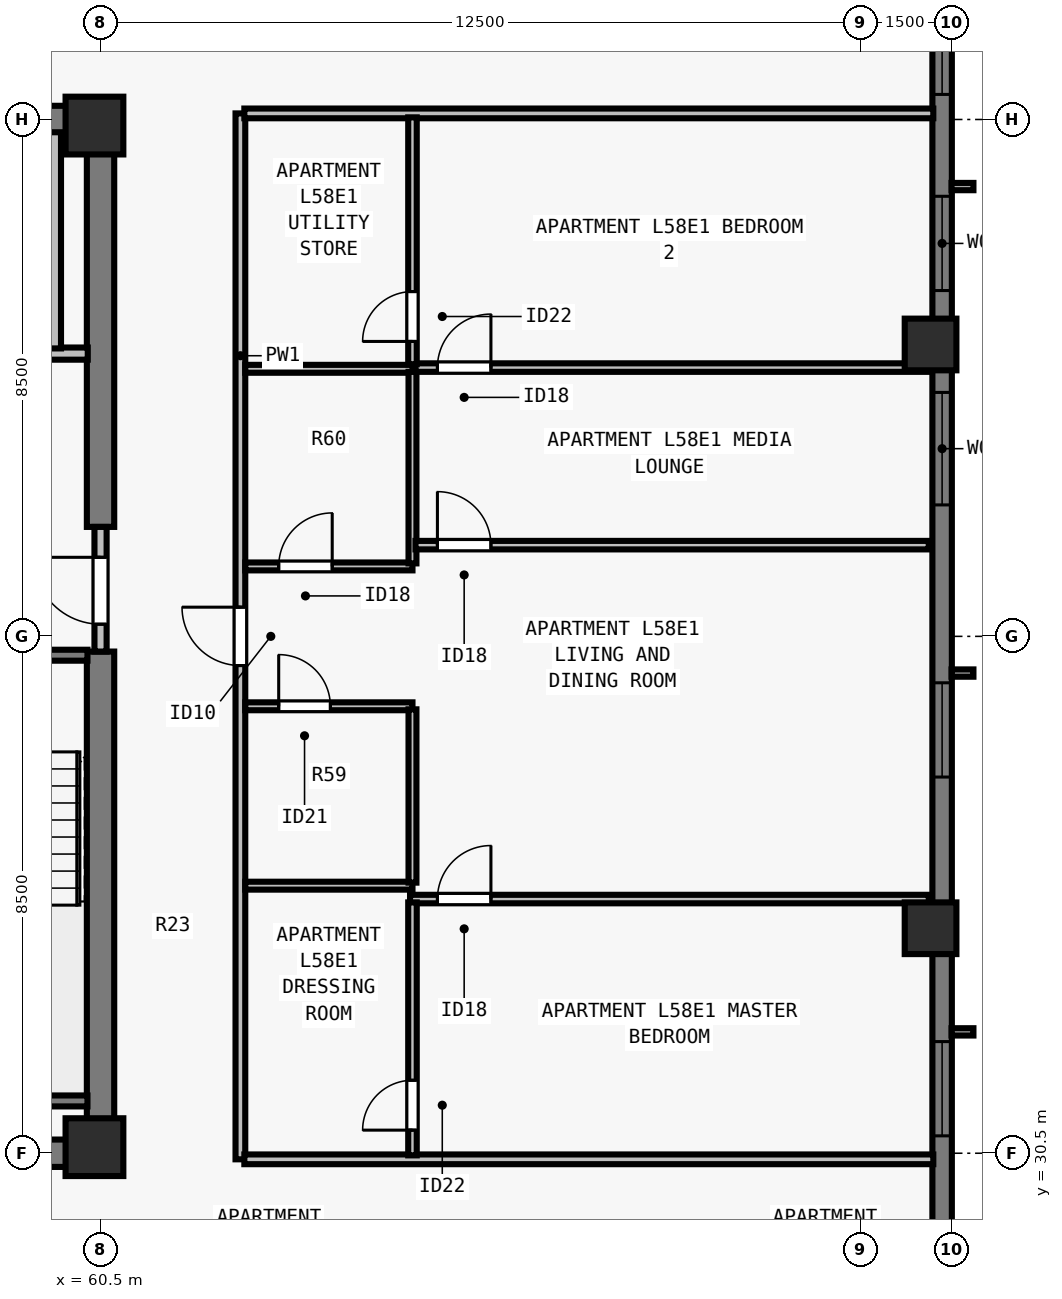
"""IFC4 building model, lengths in metres.
Left out: names, types, materials, properties, quantities, classifications, styles, units other than length and angle.
Written with IfcOpenShell. Run it as: python <this file> out.ifc"""

import sys

from ifc_helpers import new_model, si_unit, direction, frame, frame_2d, origin, origin_2d, place, context, subcontext, project, spatial, rectangle, extrude, element, fill, save


model = new_model("IFC4")
c1 = context("Model", 3, precision=1e-05, world=origin(), true_north=direction((0.0, 1.0)))
c2 = subcontext(c1, "Body", "Model", "MODEL_VIEW")
j1 = project(units=[si_unit("LENGTHUNIT", "METRE"), si_unit("PLANEANGLEUNIT", "RADIAN")], contexts=[c1])
p1 = place(None, origin())
s1 = spatial("IfcSite", under=j1, at=p1, CompositionType="ELEMENT")
p2 = place(p1, origin())
s2 = spatial("IfcBuilding", under=s1, at=p2, CompositionType="ELEMENT")
p3 = place(p2, frame((0.0, 0.0, 213.0)))
s3 = spatial("IfcBuildingStorey", under=s2, at=p3, CompositionType="ELEMENT", Elevation=213.0)
for number, where, z_axis, x_axis in (
    (1, (60.4, 30.6, 0.0), (0.0, 0.0, 1.0), (1.0, 0.0, 0.0)),
    (2, (60.4, 47.4, 0.0), (0.0, 0.0, 1.0), (1.0, 0.0, 0.0)),
):
    element("IfcColumn", number, at=place(p3, frame(where, z_axis=z_axis, x_axis=x_axis)), inside=s3, PredefinedType="COLUMN", context=c2, shape_type="SweptSolid", body=[
        extrude(rectangle(XDim=0.95, YDim=0.95, at=origin_2d()), origin(), (0.0, 0.0, 1.0), 3.5),
    ])
for number, where, z_axis, x_axis in (
    (3, (74.15, 34.2, 0.0), (0.0, 0.0, 1.0), (0.0, 1.0, 0.0)),
    (4, (74.15, 43.8, 0.0), (0.0, 0.0, 1.0), (0.0, 1.0, 0.0)),
):
    element("IfcColumn", number, at=place(p3, frame(where, z_axis=z_axis, x_axis=x_axis)), inside=s3, PredefinedType="COLUMN", context=c2, shape_type="SweptSolid", body=[
        extrude(rectangle(XDim=0.85, YDim=0.85, at=origin_2d()), origin(), (0.0, 0.0, 1.0), 3.5),
    ])
p4 = place(p3, frame((74.34, 56.5, 0.0), z_axis=(0.0, 0.0, 1.0), x_axis=(0.0, -1.0, 0.0)))
e5 = element("IfcWall", 5, at=p4, inside=s3, PredefinedType="SOLIDWALL", context=c2, shape_type="SweptSolid", body=[
    extrude(rectangle(XDim=34.702, YDim=0.32, at=frame_2d((17.351, 0.0))), origin(), (0.0, 0.0, 1.0), 3.29),
])
p5 = place(p4, frame((4.312, 0.0, 0.8)))
e6 = element("IfcOpeningElement", 6, at=p5, cuts=e5, PredefinedType="OPENING", context=c2, shape_type="SweptSolid", body=[
    extrude(rectangle(XDim=1.55, YDim=1.678, at=frame_2d((0.775, 0.839))), frame((0.0, 0.17, 0.0), z_axis=(0.0, -1.0, 0.0), x_axis=(1.0, 0.0, 0.0)), (0.0, 0.0, 1.0), 0.34),
])
p6 = place(p4, frame((6.738, 0.0, 0.8)))
e7 = element("IfcOpeningElement", 7, at=p6, cuts=e5, PredefinedType="OPENING", context=c2, shape_type="SweptSolid", body=[
    extrude(rectangle(XDim=1.85, YDim=1.678, at=frame_2d((0.925, 0.839))), frame((0.0, 0.17, 0.0), z_axis=(0.0, -1.0, 0.0), x_axis=(1.0, 0.0, 0.0)), (0.0, 0.0, 1.0), 0.34),
])
p7 = place(p4, frame((10.263, 0.0, 0.8)))
e8 = element("IfcOpeningElement", 8, at=p7, cuts=e5, PredefinedType="OPENING", context=c2, shape_type="SweptSolid", body=[
    extrude(rectangle(XDim=1.55, YDim=1.678, at=frame_2d((0.775, 0.839))), frame((0.0, 0.17, 0.0), z_axis=(0.0, -1.0, 0.0), x_axis=(1.0, 0.0, 0.0)), (0.0, 0.0, 1.0), 0.34),
])
p8 = place(p4, frame((13.488, 0.0, 0.8)))
e9 = element("IfcOpeningElement", 9, at=p8, cuts=e5, PredefinedType="OPENING", context=c2, shape_type="SweptSolid", body=[
    extrude(rectangle(XDim=1.85, YDim=1.678, at=frame_2d((0.925, 0.839))), frame((0.0, 0.17, 0.0), z_axis=(0.0, -1.0, 0.0), x_axis=(1.0, 0.0, 0.0)), (0.0, 0.0, 1.0), 0.34),
])
p9 = place(p4, frame((18.264, 0.0, 0.8)))
e10 = element("IfcOpeningElement", 10, at=p9, cuts=e5, PredefinedType="OPENING", context=c2, shape_type="SweptSolid", body=[
    extrude(rectangle(XDim=1.55, YDim=1.678, at=frame_2d((0.775, 0.839))), frame((0.0, 0.17, 0.0), z_axis=(0.0, -1.0, 0.0), x_axis=(1.0, 0.0, 0.0)), (0.0, 0.0, 1.0), 0.34),
])
p10 = place(p4, frame((24.164, 0.0, 0.8)))
e11 = element("IfcOpeningElement", 11, at=p10, cuts=e5, PredefinedType="OPENING", context=c2, shape_type="SweptSolid", body=[
    extrude(rectangle(XDim=1.55, YDim=1.678, at=frame_2d((0.775, 0.839))), frame((0.0, 0.17, 0.0), z_axis=(0.0, -1.0, 0.0), x_axis=(1.0, 0.0, 0.0)), (0.0, 0.0, 1.0), 0.34),
])
for number, where, z_axis, x_axis in (
    (12, (43.275, 30.5, 0.0), (0.0, 0.0, 1.0), (1.0, 0.0, 0.0)),
    (13, (43.275, 47.5, 0.0), (0.0, 0.0, 1.0), (1.0, 0.0, 0.0)),
):
    element("IfcWall", number, at=place(p3, frame(where, z_axis=z_axis, x_axis=x_axis)), inside=s3, PredefinedType="SHEAR", context=c2, shape_type="SweptSolid", body=[
        extrude(rectangle(XDim=17.45, YDim=0.45, at=frame_2d((8.725, 0.0))), origin(), (0.0, 0.0, 1.0), 3.29),
    ])
p11 = place(p3, frame((60.5, 30.715, 0.0), z_axis=(0.0, 0.0, 1.0), x_axis=(0.0, 1.0, 0.0)))
e14 = element("IfcWall", 14, at=p11, inside=s3, PredefinedType="SHEAR", context=c2, shape_type="SweptSolid", body=[
    extrude(rectangle(XDim=8.035, YDim=0.45, at=frame_2d((4.018, 0.0))), origin(), (0.0, 0.0, 1.0), 3.29),
])
p12 = place(p3, frame((60.5, 40.8, 0.0), z_axis=(0.0, 0.0, 1.0), x_axis=(0.0, 1.0, 0.0)))
e15 = element("IfcWall", 15, at=p12, inside=s3, PredefinedType="SHEAR", context=c2, shape_type="SweptSolid", body=[
    extrude(rectangle(XDim=6.485, YDim=0.45, at=frame_2d((3.242, 0.0))), origin(), (0.0, 0.0, 1.0), 3.29),
])
p13 = place(p3, frame((60.5, 38.75, 0.0), z_axis=(0.0, 0.0, 1.0), x_axis=(0.0, 1.0, 0.0)))
e16 = element("IfcWall", 16, at=p13, inside=s3, PredefinedType="SOLIDWALL", context=c2, shape_type="SweptSolid", body=[
    extrude(rectangle(XDim=2.05, YDim=0.2, at=frame_2d((1.025, 0.0))), origin(), (0.0, 0.0, 1.0), 3.29),
])
p14 = place(p13, frame((0.45, 0.0, 0.0)))
e17 = element("IfcOpeningElement", 17, at=p14, cuts=e16, PredefinedType="OPENING", context=c2, shape_type="SweptSolid", body=[
    extrude(rectangle(XDim=1.1, YDim=2.15, at=frame_2d((0.55, 1.075))), frame((0.0, 0.11, 0.0), z_axis=(0.0, -1.0, 0.0), x_axis=(1.0, 0.0, 0.0)), (0.0, 0.0, 1.0), 0.22),
])
p15 = place(p3, frame((56.735, 43.65, 0.0), z_axis=(0.0, 0.0, 1.0), x_axis=(1.0, 0.0, 0.0)))
e18 = element("IfcWall", 18, at=p15, inside=s3, PredefinedType="SOLIDWALL", context=c2, shape_type="SweptSolid", body=[
    extrude(rectangle(XDim=3.555, YDim=0.2, at=frame_2d((1.777, 0.0))), origin(), (0.0, 0.0, 1.0), 3.29),
])
p16 = place(p15, frame((1.295, 0.0, 0.0)))
e19 = element("IfcOpeningElement", 19, at=p16, cuts=e18, PredefinedType="OPENING", context=c2, shape_type="SweptSolid", body=[
    extrude(rectangle(XDim=1.1, YDim=2.2, at=frame_2d((0.55, 1.1))), frame((0.0, 0.11, 0.0), z_axis=(0.0, -1.0, 0.0), x_axis=(1.0, 0.0, 0.0)), (0.0, 0.0, 1.0), 0.22),
])
p17 = place(p3, frame((59.75, 43.735, 0.0), z_axis=(0.0, 0.0, 1.0), x_axis=(0.0, 1.0, 0.0)))
e20 = element("IfcWall", 20, at=p17, inside=s3, PredefinedType="SOLIDWALL", context=c2, shape_type="SweptSolid", body=[
    extrude(rectangle(XDim=3.555, YDim=0.2, at=frame_2d((1.777, 0.0))), origin(), (0.0, 0.0, 1.0), 3.29),
])
p18 = place(p3, frame((62.8, 30.4, 0.0), z_axis=(0.0, 0.0, 1.0), x_axis=(0.0, 1.0, 0.0)))
e21 = element("IfcWall", 21, at=p18, inside=s3, PredefinedType="PARTITIONING", context=c2, shape_type="SweptSolid", body=[
    extrude(rectangle(XDim=17.2, YDim=0.16, at=frame_2d((8.6, 0.0))), origin(), (0.0, 0.0, 1.0), 3.29),
])
p19 = place(p18, frame((8.12, 0.0, 0.0)))
e22 = element("IfcOpeningElement", 22, at=p19, cuts=e21, PredefinedType="OPENING", context=c2, shape_type="SweptSolid", body=[
    extrude(rectangle(XDim=0.96, YDim=2.18, at=frame_2d((0.48, 1.09))), frame((0.0, 0.09, 0.0), z_axis=(0.0, -1.0, 0.0), x_axis=(1.0, 0.0, 0.0)), (0.0, 0.0, 1.0), 0.18),
])
for number, where, z_axis, x_axis in (
    (23, (62.865, 30.4, 0.0), (0.0, 0.0, 1.0), (1.0, 0.0, 0.0)),
    (24, (62.865, 47.6, 0.0), (0.0, 0.0, 1.0), (1.0, 0.0, 0.0)),
):
    element("IfcWall", number, at=place(p3, frame(where, z_axis=z_axis, x_axis=x_axis)), inside=s3, PredefinedType="PARTITIONING", context=c2, shape_type="SweptSolid", body=[
        extrude(rectangle(XDim=11.33, YDim=0.16, at=frame_2d((5.665, 0.0))), origin(), (0.0, 0.0, 1.0), 3.29),
    ])
p20 = place(p3, frame((62.88, 34.9, 0.0), z_axis=(0.0, 0.0, 1.0), x_axis=(1.0, 0.0, 0.0)))
e25 = element("IfcWall", 25, at=p20, inside=s3, PredefinedType="PLUMBINGWALL", context=c2, shape_type="SweptSolid", body=[
    extrude(rectangle(XDim=2.75, YDim=0.13, at=frame_2d((1.375, 0.0))), origin(), (0.0, 0.0, 1.0), 3.29),
])
p21 = place(p3, frame((62.88, 37.85, 0.0), z_axis=(0.0, 0.0, 1.0), x_axis=(1.0, 0.0, 0.0)))
e26 = element("IfcWall", 26, at=p21, inside=s3, PredefinedType="PLUMBINGWALL", context=c2, shape_type="SweptSolid", body=[
    extrude(rectangle(XDim=2.75, YDim=0.13, at=frame_2d((1.375, 0.0))), origin(), (0.0, 0.0, 1.0), 3.29),
])
p22 = place(p21, frame((0.55, 0.0, 0.0)))
e27 = element("IfcOpeningElement", 27, at=p22, cuts=e26, PredefinedType="OPENING", context=c2, shape_type="SweptSolid", body=[
    extrude(rectangle(XDim=0.85, YDim=2.08, at=frame_2d((0.425, 1.04))), frame((0.0, 0.075, 0.0), z_axis=(0.0, -1.0, 0.0), x_axis=(1.0, 0.0, 0.0)), (0.0, 0.0, 1.0), 0.15),
])
p23 = place(p3, frame((65.63, 34.95, 0.0), z_axis=(0.0, 0.0, 1.0), x_axis=(0.0, 1.0, 0.0)))
e28 = element("IfcWall", 28, at=p23, inside=s3, PredefinedType="PLUMBINGWALL", context=c2, shape_type="SweptSolid", body=[
    extrude(rectangle(XDim=2.85, YDim=0.13, at=frame_2d((1.425, 0.0))), origin(), (0.0, 0.0, 1.0), 3.29),
])
p24 = place(p3, frame((62.88, 43.4, 0.0), z_axis=(0.0, 0.0, 1.0), x_axis=(1.0, 0.0, 0.0)))
e29 = element("IfcWall", 29, at=p24, inside=s3, PredefinedType="PLUMBINGWALL", context=c2, shape_type="SweptSolid", body=[
    extrude(rectangle(XDim=2.75, YDim=0.13, at=frame_2d((1.375, 0.0))), origin(), (0.0, 0.0, 1.0), 3.29),
])
p25 = place(p3, frame((62.88, 40.15, 0.0), z_axis=(0.0, 0.0, 1.0), x_axis=(1.0, 0.0, 0.0)))
e30 = element("IfcWall", 30, at=p25, inside=s3, PredefinedType="PLUMBINGWALL", context=c2, shape_type="SweptSolid", body=[
    extrude(rectangle(XDim=2.75, YDim=0.13, at=frame_2d((1.375, 0.0))), origin(), (0.0, 0.0, 1.0), 3.29),
])
p26 = place(p25, frame((0.55, 0.0, 0.0)))
e31 = element("IfcOpeningElement", 31, at=p26, cuts=e30, PredefinedType="OPENING", context=c2, shape_type="SweptSolid", body=[
    extrude(rectangle(XDim=0.88, YDim=2.1, at=frame_2d((0.44, 1.05))), frame((0.0, 0.075, 0.0), z_axis=(0.0, -1.0, 0.0), x_axis=(1.0, 0.0, 0.0)), (0.0, 0.0, 1.0), 0.15),
])
p27 = place(p3, frame((65.63, 40.2, 0.0), z_axis=(0.0, 0.0, 1.0), x_axis=(0.0, 1.0, 0.0)))
e32 = element("IfcWall", 32, at=p27, inside=s3, PredefinedType="PLUMBINGWALL", context=c2, shape_type="SweptSolid", body=[
    extrude(rectangle(XDim=3.15, YDim=0.13, at=frame_2d((1.575, 0.0))), origin(), (0.0, 0.0, 1.0), 3.29),
])
p28 = place(p3, frame((65.59, 34.68, 0.0), z_axis=(0.0, 0.0, 1.0), x_axis=(1.0, 0.0, 0.0)))
e33 = element("IfcWall", 33, at=p28, inside=s3, PredefinedType="PARTITIONING", context=c2, shape_type="SweptSolid", body=[
    extrude(rectangle(XDim=8.53, YDim=0.14, at=frame_2d((4.265, 0.0))), origin(), (0.0, 0.0, 1.0), 3.29),
])
p29 = place(p28, frame((0.45, 0.0, 0.0)))
e34 = element("IfcOpeningElement", 34, at=p29, cuts=e33, PredefinedType="OPENING", context=c2, shape_type="SweptSolid", body=[
    extrude(rectangle(XDim=0.88, YDim=2.1, at=frame_2d((0.44, 1.05))), frame((0.0, 0.08, 0.0), z_axis=(0.0, -1.0, 0.0), x_axis=(1.0, 0.0, 0.0)), (0.0, 0.0, 1.0), 0.16),
])
p30 = place(p3, frame((65.63, 30.465, 0.0), z_axis=(0.0, 0.0, 1.0), x_axis=(0.0, 1.0, 0.0)))
e35 = element("IfcWall", 35, at=p30, inside=s3, PredefinedType="PARTITIONING", context=c2, shape_type="SweptSolid", body=[
    extrude(rectangle(XDim=4.16, YDim=0.14, at=frame_2d((2.08, 0.0))), origin(), (0.0, 0.0, 1.0), 3.29),
])
p31 = place(p30, frame((0.415, 0.0, 0.0)))
e36 = element("IfcOpeningElement", 36, at=p31, cuts=e35, PredefinedType="OPENING", context=c2, shape_type="SweptSolid", body=[
    extrude(rectangle(XDim=0.82, YDim=2.1, at=frame_2d((0.41, 1.05))), frame((0.0, 0.08, 0.0), z_axis=(0.0, -1.0, 0.0), x_axis=(1.0, 0.0, 0.0)), (0.0, 0.0, 1.0), 0.16),
])
p32 = place(p3, frame((65.68, 43.42, 0.0), z_axis=(0.0, 0.0, 1.0), x_axis=(1.0, 0.0, 0.0)))
e37 = element("IfcWall", 37, at=p32, inside=s3, PredefinedType="PARTITIONING", context=c2, shape_type="SweptSolid", body=[
    extrude(rectangle(XDim=8.44, YDim=0.14, at=frame_2d((4.22, 0.0))), origin(), (0.0, 0.0, 1.0), 3.29),
])
p33 = place(p32, frame((0.36, 0.0, 0.0)))
e38 = element("IfcOpeningElement", 38, at=p33, cuts=e37, PredefinedType="OPENING", context=c2, shape_type="SweptSolid", body=[
    extrude(rectangle(XDim=0.88, YDim=2.1, at=frame_2d((0.44, 1.05))), frame((0.0, 0.08, 0.0), z_axis=(0.0, -1.0, 0.0), x_axis=(1.0, 0.0, 0.0)), (0.0, 0.0, 1.0), 0.16),
])
p34 = place(p3, frame((65.63, 43.475, 0.0), z_axis=(0.0, 0.0, 1.0), x_axis=(0.0, 1.0, 0.0)))
e39 = element("IfcWall", 39, at=p34, inside=s3, PredefinedType="PARTITIONING", context=c2, shape_type="SweptSolid", body=[
    extrude(rectangle(XDim=4.06, YDim=0.14, at=frame_2d((2.03, 0.0))), origin(), (0.0, 0.0, 1.0), 3.29),
])
p35 = place(p34, frame((0.375, 0.0, 0.0)))
e40 = element("IfcOpeningElement", 40, at=p35, cuts=e39, PredefinedType="OPENING", context=c2, shape_type="SweptSolid", body=[
    extrude(rectangle(XDim=0.82, YDim=2.1, at=frame_2d((0.41, 1.05))), frame((0.0, 0.08, 0.0), z_axis=(0.0, -1.0, 0.0), x_axis=(1.0, 0.0, 0.0)), (0.0, 0.0, 1.0), 0.16),
])
p36 = place(p3, frame((65.68, 40.5, 0.0), z_axis=(0.0, 0.0, 1.0), x_axis=(1.0, 0.0, 0.0)))
e41 = element("IfcWall", 41, at=p36, inside=s3, PredefinedType="PARTITIONING", context=c2, shape_type="SweptSolid", body=[
    extrude(rectangle(XDim=8.44, YDim=0.14, at=frame_2d((4.22, 0.0))), origin(), (0.0, 0.0, 1.0), 3.29),
])
p37 = place(p36, frame((0.36, 0.0, 0.0)))
e42 = element("IfcOpeningElement", 42, at=p37, cuts=e41, PredefinedType="OPENING", context=c2, shape_type="SweptSolid", body=[
    extrude(rectangle(XDim=0.88, YDim=2.1, at=frame_2d((0.44, 1.05))), frame((0.0, 0.08, 0.0), z_axis=(0.0, -1.0, 0.0), x_axis=(1.0, 0.0, 0.0)), (0.0, 0.0, 1.0), 0.16),
])
p38 = place(p3, frame((57.005, 38.69, 0.0), z_axis=(0.0, 0.0, 1.0), x_axis=(1.0, 0.0, 0.0)))
e43 = element("IfcWall", 43, at=p38, inside=s3, PredefinedType="SOLIDWALL", context=c2, shape_type="SweptSolid", body=[
    extrude(rectangle(XDim=3.28, YDim=0.18, at=frame_2d((1.64, 0.0))), origin(), (0.0, 0.0, 1.0), 3.29),
])
p39 = place(p38, frame((1.165, 0.0, 0.0)))
e44 = element("IfcOpeningElement", 44, at=p39, cuts=e43, PredefinedType="OPENING", context=c2, shape_type="SweptSolid", body=[
    extrude(rectangle(XDim=0.95, YDim=2.15, at=frame_2d((0.475, 1.075))), frame((0.0, 0.1, 0.0), z_axis=(0.0, -1.0, 0.0), x_axis=(1.0, 0.0, 0.0)), (0.0, 0.0, 1.0), 0.2),
])
p40 = place(p3, frame((57.005, 31.36, 0.0), z_axis=(0.0, 0.0, 1.0), x_axis=(1.0, 0.0, 0.0)))
e45 = element("IfcWall", 45, at=p40, inside=s3, PredefinedType="SOLIDWALL", context=c2, shape_type="SweptSolid", body=[
    extrude(rectangle(XDim=3.28, YDim=0.18, at=frame_2d((1.64, 0.0))), origin(), (0.0, 0.0, 1.0), 3.29),
])
p41 = place(p6, origin())
e46 = element("IfcWindow", 46, at=p41, inside=s3, PartitioningType="SINGLE_PANEL", PredefinedType="WINDOW", context=c2, shape_type="SweptSolid", body=[
    extrude(rectangle(XDim=1.85, YDim=1.678, at=frame_2d((0.925, 0.839))), frame((0.0, -0.05, 0.0), z_axis=(0.0, -1.0, 0.0), x_axis=(1.0, 0.0, 0.0)), (0.0, 0.0, 1.0), 0.06),
])
fill(e7, e46)
p42 = place(p7, origin())
e47 = element("IfcWindow", 47, at=p42, inside=s3, PartitioningType="SINGLE_PANEL", PredefinedType="WINDOW", context=c2, shape_type="SweptSolid", body=[
    extrude(rectangle(XDim=1.55, YDim=1.678, at=frame_2d((0.775, 0.839))), frame((0.0, -0.05, 0.0), z_axis=(0.0, -1.0, 0.0), x_axis=(1.0, 0.0, 0.0)), (0.0, 0.0, 1.0), 0.06),
])
fill(e8, e47)
p43 = place(p8, origin())
e48 = element("IfcWindow", 48, at=p43, inside=s3, PartitioningType="SINGLE_PANEL", PredefinedType="WINDOW", context=c2, shape_type="SweptSolid", body=[
    extrude(rectangle(XDim=1.85, YDim=1.678, at=frame_2d((0.925, 0.839))), frame((0.0, -0.05, 0.0), z_axis=(0.0, -1.0, 0.0), x_axis=(1.0, 0.0, 0.0)), (0.0, 0.0, 1.0), 0.06),
])
fill(e9, e48)
p44 = place(p9, origin())
e49 = element("IfcWindow", 49, at=p44, inside=s3, PartitioningType="SINGLE_PANEL", PredefinedType="WINDOW", context=c2, shape_type="SweptSolid", body=[
    extrude(rectangle(XDim=1.55, YDim=1.678, at=frame_2d((0.775, 0.839))), frame((0.0, -0.05, 0.0), z_axis=(0.0, -1.0, 0.0), x_axis=(1.0, 0.0, 0.0)), (0.0, 0.0, 1.0), 0.06),
])
fill(e10, e49)
p45 = place(p10, origin())
e50 = element("IfcWindow", 50, at=p45, inside=s3, PartitioningType="SINGLE_PANEL", PredefinedType="WINDOW", context=c2, shape_type="SweptSolid", body=[
    extrude(rectangle(XDim=1.55, YDim=1.678, at=frame_2d((0.775, 0.839))), frame((0.0, -0.05, 0.0), z_axis=(0.0, -1.0, 0.0), x_axis=(1.0, 0.0, 0.0)), (0.0, 0.0, 1.0), 0.06),
])
fill(e11, e50)
p46 = place(p14, origin())
e51 = element("IfcDoor", 51, at=p46, inside=s3, OperationType="SINGLE_SWING_RIGHT", PredefinedType="DOOR", context=c2, shape_type="SweptSolid", body=[
    extrude(rectangle(XDim=1.1, YDim=2.15, at=frame_2d((0.55, 1.075))), frame((0.0, 0.025, 0.0), z_axis=(0.0, -1.0, 0.0), x_axis=(1.0, 0.0, 0.0)), (0.0, 0.0, 1.0), 0.05),
])
fill(e17, e51)
p47 = place(p22, origin())
e52 = element("IfcDoor", 52, at=p47, inside=s3, OperationType="SINGLE_SWING_LEFT", PredefinedType="DOOR", context=c2, shape_type="SweptSolid", body=[
    extrude(rectangle(XDim=0.85, YDim=2.08, at=frame_2d((0.425, 1.04))), frame((0.0, 0.025, 0.0), z_axis=(0.0, -1.0, 0.0), x_axis=(1.0, 0.0, 0.0)), (0.0, 0.0, 1.0), 0.05),
])
fill(e27, e52)
p48 = place(p26, origin())
e53 = element("IfcDoor", 53, at=p48, inside=s3, OperationType="SINGLE_SWING_RIGHT", PredefinedType="DOOR", context=c2, shape_type="SweptSolid", body=[
    extrude(rectangle(XDim=0.88, YDim=2.1, at=frame_2d((0.44, 1.05))), frame((0.0, 0.025, 0.0), z_axis=(0.0, -1.0, 0.0), x_axis=(1.0, 0.0, 0.0)), (0.0, 0.0, 1.0), 0.05),
])
fill(e31, e53)
p49 = place(p31, origin())
e54 = element("IfcDoor", 54, at=p49, inside=s3, OperationType="SINGLE_SWING_LEFT", PredefinedType="DOOR", context=c2, shape_type="SweptSolid", body=[
    extrude(rectangle(XDim=0.82, YDim=2.1, at=frame_2d((0.41, 1.05))), frame((0.0, 0.025, 0.0), z_axis=(0.0, -1.0, 0.0), x_axis=(1.0, 0.0, 0.0)), (0.0, 0.0, 1.0), 0.05),
])
fill(e36, e54)
p50 = place(p29, origin())
e55 = element("IfcDoor", 55, at=p50, inside=s3, OperationType="SINGLE_SWING_RIGHT", PredefinedType="DOOR", context=c2, shape_type="SweptSolid", body=[
    extrude(rectangle(XDim=0.88, YDim=2.1, at=frame_2d((0.44, 1.05))), frame((0.0, 0.025, 0.0), z_axis=(0.0, -1.0, 0.0), x_axis=(1.0, 0.0, 0.0)), (0.0, 0.0, 1.0), 0.05),
])
fill(e34, e55)
p51 = place(p35, origin())
e56 = element("IfcDoor", 56, at=p51, inside=s3, OperationType="SINGLE_SWING_LEFT", PredefinedType="DOOR", context=c2, shape_type="SweptSolid", body=[
    extrude(rectangle(XDim=0.82, YDim=2.1, at=frame_2d((0.41, 1.05))), frame((0.0, 0.025, 0.0), z_axis=(0.0, -1.0, 0.0), x_axis=(1.0, 0.0, 0.0)), (0.0, 0.0, 1.0), 0.05),
])
fill(e40, e56)
p52 = place(p33, origin())
e57 = element("IfcDoor", 57, at=p52, inside=s3, OperationType="SINGLE_SWING_RIGHT", PredefinedType="DOOR", context=c2, shape_type="SweptSolid", body=[
    extrude(rectangle(XDim=0.88, YDim=2.1, at=frame_2d((0.44, 1.05))), frame((0.0, 0.025, 0.0), z_axis=(0.0, -1.0, 0.0), x_axis=(1.0, 0.0, 0.0)), (0.0, 0.0, 1.0), 0.05),
])
fill(e38, e57)
p53 = place(p37, origin())
e58 = element("IfcDoor", 58, at=p53, inside=s3, OperationType="SINGLE_SWING_LEFT", PredefinedType="DOOR", context=c2, shape_type="SweptSolid", body=[
    extrude(rectangle(XDim=0.88, YDim=2.1, at=frame_2d((0.44, 1.05))), frame((0.0, 0.025, 0.0), z_axis=(0.0, -1.0, 0.0), x_axis=(1.0, 0.0, 0.0)), (0.0, 0.0, 1.0), 0.05),
])
fill(e42, e58)
p54 = place(p19, origin())
e59 = element("IfcDoor", 59, at=p54, inside=s3, OperationType="SINGLE_SWING_RIGHT", PredefinedType="DOOR", context=c2, shape_type="SweptSolid", body=[
    extrude(rectangle(XDim=0.96, YDim=2.18, at=frame_2d((0.48, 1.09))), frame((0.0, 0.025, 0.0), z_axis=(0.0, -1.0, 0.0), x_axis=(1.0, 0.0, 0.0)), (0.0, 0.0, 1.0), 0.05),
])
fill(e22, e59)
save(model, sys.argv[1])
